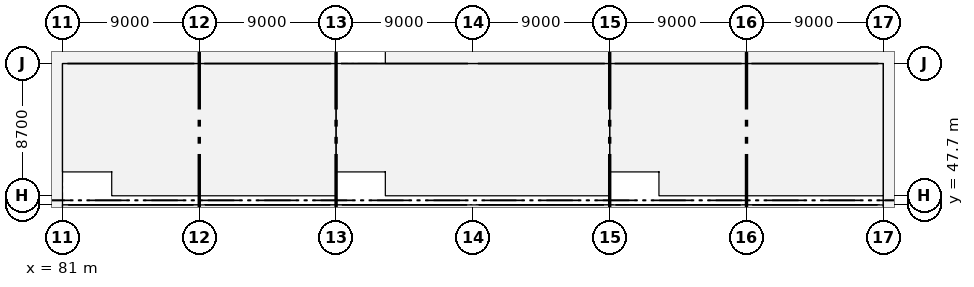
"""IFC4 building model, lengths in metres.
Left out: names, types, materials, properties, quantities, classifications, styles, units other than length and angle.
Written with IfcOpenShell. Run it as: python <this file> out.ifc"""

import sys

from ifc_helpers import new_model, si_unit, direction, frame, frame_2d, origin, origin_2d, place, context, subcontext, project, spatial, rectangle, extrude, element, fill, save


model = new_model("IFC4")
c1 = context("Model", 3, precision=1e-05, world=origin(), true_north=direction((0.0, 1.0)))
c2 = subcontext(c1, "Body", "Model", "MODEL_VIEW")
j1 = project(units=[si_unit("LENGTHUNIT", "METRE"), si_unit("PLANEANGLEUNIT", "RADIAN")], contexts=[c1])
p1 = place(None, origin())
s1 = spatial("IfcSite", under=j1, at=p1, CompositionType="ELEMENT")
p2 = place(p1, origin())
s2 = spatial("IfcBuilding", under=s1, at=p2, CompositionType="ELEMENT")
p3 = place(p2, origin())
s3 = spatial("IfcBuildingStorey", under=s2, at=p3, CompositionType="ELEMENT", Elevation=0.0)
p4 = place(p3, frame((81.0, 47.7, -0.5), z_axis=(0.0, 0.0, 1.0), x_axis=(1.0, 0.0, 0.0)))
e1 = element("IfcColumn", 1, at=p4, inside=s3, PredefinedType="COLUMN", context=c2, shape_type="SweptSolid", body=[
    extrude(rectangle(XDim=0.75, YDim=0.55, at=origin_2d()), origin(), (0.0, 0.0, 1.0), 6.8),
])
p5 = place(p3, frame((81.0, 48.3, -0.5), z_axis=(0.0, 0.0, 1.0), x_axis=(1.0, 0.0, 0.0)))
e2 = element("IfcColumn", 2, at=p5, inside=s3, PredefinedType="COLUMN", context=c2, shape_type="SweptSolid", body=[
    extrude(rectangle(XDim=0.75, YDim=0.55, at=origin_2d()), origin(), (0.0, 0.0, 1.0), 7.3),
])
p6 = place(p3, frame((81.0, 57.0, -0.5), z_axis=(0.0, 0.0, 1.0), x_axis=(1.0, 0.0, 0.0)))
e3 = element("IfcColumn", 3, at=p6, inside=s3, PredefinedType="COLUMN", context=c2, shape_type="SweptSolid", body=[
    extrude(rectangle(XDim=0.65, YDim=0.65, at=origin_2d()), origin(), (0.0, 0.0, 1.0), 7.3),
])
p7 = place(p3, frame((90.0, 47.7, -0.5), z_axis=(0.0, 0.0, 1.0), x_axis=(1.0, 0.0, 0.0)))
e4 = element("IfcColumn", 4, at=p7, inside=s3, PredefinedType="COLUMN", context=c2, shape_type="SweptSolid", body=[
    extrude(rectangle(XDim=0.75, YDim=0.55, at=origin_2d()), origin(), (0.0, 0.0, 1.0), 6.8),
])
p8 = place(p3, frame((90.0, 48.3, -0.5), z_axis=(0.0, 0.0, 1.0), x_axis=(1.0, 0.0, 0.0)))
e5 = element("IfcColumn", 5, at=p8, inside=s3, PredefinedType="COLUMN", context=c2, shape_type="SweptSolid", body=[
    extrude(rectangle(XDim=0.75, YDim=0.55, at=origin_2d()), origin(), (0.0, 0.0, 1.0), 7.3),
])
p9 = place(p3, frame((90.0, 57.0, -0.5), z_axis=(0.0, 0.0, 1.0), x_axis=(1.0, 0.0, 0.0)))
e6 = element("IfcColumn", 6, at=p9, inside=s3, PredefinedType="COLUMN", context=c2, shape_type="SweptSolid", body=[
    extrude(rectangle(XDim=0.65, YDim=0.65, at=origin_2d()), origin(), (0.0, 0.0, 1.0), 7.3),
])
p10 = place(p3, frame((99.0, 47.7, -0.5), z_axis=(0.0, 0.0, 1.0), x_axis=(1.0, 0.0, 0.0)))
e7 = element("IfcColumn", 7, at=p10, inside=s3, PredefinedType="COLUMN", context=c2, shape_type="SweptSolid", body=[
    extrude(rectangle(XDim=0.75, YDim=0.55, at=origin_2d()), origin(), (0.0, 0.0, 1.0), 6.8),
])
p11 = place(p3, frame((99.0, 48.3, -0.5), z_axis=(0.0, 0.0, 1.0), x_axis=(1.0, 0.0, 0.0)))
e8 = element("IfcColumn", 8, at=p11, inside=s3, PredefinedType="COLUMN", context=c2, shape_type="SweptSolid", body=[
    extrude(rectangle(XDim=0.75, YDim=0.55, at=origin_2d()), origin(), (0.0, 0.0, 1.0), 7.3),
])
p12 = place(p3, frame((99.0, 57.0, -0.5), z_axis=(0.0, 0.0, 1.0), x_axis=(1.0, 0.0, 0.0)))
e9 = element("IfcColumn", 9, at=p12, inside=s3, PredefinedType="COLUMN", context=c2, shape_type="SweptSolid", body=[
    extrude(rectangle(XDim=0.65, YDim=0.65, at=origin_2d()), origin(), (0.0, 0.0, 1.0), 7.3),
])
p13 = place(p3, frame((108.0, 47.7, -0.5), z_axis=(0.0, 0.0, 1.0), x_axis=(1.0, 0.0, 0.0)))
e10 = element("IfcColumn", 10, at=p13, inside=s3, PredefinedType="COLUMN", context=c2, shape_type="SweptSolid", body=[
    extrude(rectangle(XDim=0.75, YDim=0.55, at=origin_2d()), origin(), (0.0, 0.0, 1.0), 6.8),
])
p14 = place(p3, frame((108.0, 48.3, -0.5), z_axis=(0.0, 0.0, 1.0), x_axis=(1.0, 0.0, 0.0)))
e11 = element("IfcColumn", 11, at=p14, inside=s3, PredefinedType="COLUMN", context=c2, shape_type="SweptSolid", body=[
    extrude(rectangle(XDim=0.75, YDim=0.55, at=origin_2d()), origin(), (0.0, 0.0, 1.0), 7.3),
])
p15 = place(p3, frame((108.0, 57.0, -0.5), z_axis=(0.0, 0.0, 1.0), x_axis=(1.0, 0.0, 0.0)))
e12 = element("IfcColumn", 12, at=p15, inside=s3, PredefinedType="COLUMN", context=c2, shape_type="SweptSolid", body=[
    extrude(rectangle(XDim=0.65, YDim=0.65, at=origin_2d()), origin(), (0.0, 0.0, 1.0), 7.3),
])
p16 = place(p3, frame((117.0, 47.7, -0.5), z_axis=(0.0, 0.0, 1.0), x_axis=(1.0, 0.0, 0.0)))
e13 = element("IfcColumn", 13, at=p16, inside=s3, PredefinedType="COLUMN", context=c2, shape_type="SweptSolid", body=[
    extrude(rectangle(XDim=0.75, YDim=0.55, at=origin_2d()), origin(), (0.0, 0.0, 1.0), 6.8),
])
p17 = place(p3, frame((117.0, 48.3, -0.5), z_axis=(0.0, 0.0, 1.0), x_axis=(1.0, 0.0, 0.0)))
e14 = element("IfcColumn", 14, at=p17, inside=s3, PredefinedType="COLUMN", context=c2, shape_type="SweptSolid", body=[
    extrude(rectangle(XDim=0.75, YDim=0.55, at=origin_2d()), origin(), (0.0, 0.0, 1.0), 7.3),
])
p18 = place(p3, frame((117.0, 57.0, -0.5), z_axis=(0.0, 0.0, 1.0), x_axis=(1.0, 0.0, 0.0)))
e15 = element("IfcColumn", 15, at=p18, inside=s3, PredefinedType="COLUMN", context=c2, shape_type="SweptSolid", body=[
    extrude(rectangle(XDim=0.65, YDim=0.65, at=origin_2d()), origin(), (0.0, 0.0, 1.0), 7.3),
])
p19 = place(p3, frame((126.0, 47.7, -0.5), z_axis=(0.0, 0.0, 1.0), x_axis=(1.0, 0.0, 0.0)))
e16 = element("IfcColumn", 16, at=p19, inside=s3, PredefinedType="COLUMN", context=c2, shape_type="SweptSolid", body=[
    extrude(rectangle(XDim=0.75, YDim=0.55, at=origin_2d()), origin(), (0.0, 0.0, 1.0), 6.8),
])
p20 = place(p3, frame((126.0, 48.3, -0.5), z_axis=(0.0, 0.0, 1.0), x_axis=(1.0, 0.0, 0.0)))
e17 = element("IfcColumn", 17, at=p20, inside=s3, PredefinedType="COLUMN", context=c2, shape_type="SweptSolid", body=[
    extrude(rectangle(XDim=0.75, YDim=0.55, at=origin_2d()), origin(), (0.0, 0.0, 1.0), 7.3),
])
p21 = place(p3, frame((126.0, 57.0, -0.5), z_axis=(0.0, 0.0, 1.0), x_axis=(1.0, 0.0, 0.0)))
e18 = element("IfcColumn", 18, at=p21, inside=s3, PredefinedType="COLUMN", context=c2, shape_type="SweptSolid", body=[
    extrude(rectangle(XDim=0.65, YDim=0.65, at=origin_2d()), origin(), (0.0, 0.0, 1.0), 7.3),
])
p22 = place(p3, frame((135.0, 47.7, -0.5), z_axis=(0.0, 0.0, 1.0), x_axis=(1.0, 0.0, 0.0)))
e19 = element("IfcColumn", 19, at=p22, inside=s3, PredefinedType="COLUMN", context=c2, shape_type="SweptSolid", body=[
    extrude(rectangle(XDim=0.75, YDim=0.55, at=origin_2d()), origin(), (0.0, 0.0, 1.0), 6.8),
])
p23 = place(p3, frame((135.0, 48.3, -0.5), z_axis=(0.0, 0.0, 1.0), x_axis=(1.0, 0.0, 0.0)))
e20 = element("IfcColumn", 20, at=p23, inside=s3, PredefinedType="COLUMN", context=c2, shape_type="SweptSolid", body=[
    extrude(rectangle(XDim=0.75, YDim=0.55, at=origin_2d()), origin(), (0.0, 0.0, 1.0), 7.3),
])
p24 = place(p3, frame((135.0, 57.0, -0.5), z_axis=(0.0, 0.0, 1.0), x_axis=(1.0, 0.0, 0.0)))
e21 = element("IfcColumn", 21, at=p24, inside=s3, PredefinedType="COLUMN", context=c2, shape_type="SweptSolid", body=[
    extrude(rectangle(XDim=0.65, YDim=0.65, at=origin_2d()), origin(), (0.0, 0.0, 1.0), 7.3),
])
p25 = place(p3, frame((81.375, 47.7, 0.0), z_axis=(0.0, 0.0, 1.0), x_axis=(1.0, 0.0, 0.0)))
e22 = element("IfcWall", 22, at=p25, inside=s3, PredefinedType="SOLIDWALL", context=c2, shape_type="SweptSolid", body=[
    extrude(rectangle(XDim=8.25, YDim=0.34, at=frame_2d((4.125, 0.0))), origin(), (0.0, 0.0, 1.0), 5.1),
])
p26 = place(p25, frame((1.85, 0.0, 0.85)))
e23 = element("IfcOpeningElement", 23, at=p26, cuts=e22, PredefinedType="OPENING", context=c2, shape_type="SweptSolid", body=[
    extrude(rectangle(XDim=1.8, YDim=3.15, at=frame_2d((0.9, 1.575))), frame((0.0, 0.18, 0.0), z_axis=(0.0, -1.0, 0.0), x_axis=(1.0, 0.0, 0.0)), (0.0, 0.0, 1.0), 0.36),
])
p27 = place(p25, frame((4.6, 0.0, 0.85)))
e24 = element("IfcOpeningElement", 24, at=p27, cuts=e22, PredefinedType="OPENING", context=c2, shape_type="SweptSolid", body=[
    extrude(rectangle(XDim=1.8, YDim=3.15, at=frame_2d((0.9, 1.575))), frame((0.0, 0.18, 0.0), z_axis=(0.0, -1.0, 0.0), x_axis=(1.0, 0.0, 0.0)), (0.0, 0.0, 1.0), 0.36),
])
p28 = place(p3, frame((90.375, 47.7, 0.0), z_axis=(0.0, 0.0, 1.0), x_axis=(1.0, 0.0, 0.0)))
e25 = element("IfcWall", 25, at=p28, inside=s3, PredefinedType="SOLIDWALL", context=c2, shape_type="SweptSolid", body=[
    extrude(rectangle(XDim=8.25, YDim=0.34, at=frame_2d((4.125, 0.0))), origin(), (0.0, 0.0, 1.0), 5.1),
])
p29 = place(p28, frame((3.125, 0.0, 0.0)))
e26 = element("IfcOpeningElement", 26, at=p29, cuts=e25, PredefinedType="OPENING", context=c2, shape_type="SweptSolid", body=[
    extrude(rectangle(XDim=2.0, YDim=2.75, at=frame_2d((1.0, 1.375))), frame((0.0, 0.18, 0.0), z_axis=(0.0, -1.0, 0.0), x_axis=(1.0, 0.0, 0.0)), (0.0, 0.0, 1.0), 0.36),
])
p30 = place(p3, frame((99.375, 47.7, 0.0), z_axis=(0.0, 0.0, 1.0), x_axis=(1.0, 0.0, 0.0)))
e27 = element("IfcWall", 27, at=p30, inside=s3, PredefinedType="SOLIDWALL", context=c2, shape_type="SweptSolid", body=[
    extrude(rectangle(XDim=8.25, YDim=0.34, at=frame_2d((4.125, 0.0))), origin(), (0.0, 0.0, 1.0), 5.1),
])
p31 = place(p30, frame((1.85, 0.0, 0.85)))
e28 = element("IfcOpeningElement", 28, at=p31, cuts=e27, PredefinedType="OPENING", context=c2, shape_type="SweptSolid", body=[
    extrude(rectangle(XDim=1.8, YDim=3.15, at=frame_2d((0.9, 1.575))), frame((0.0, 0.18, 0.0), z_axis=(0.0, -1.0, 0.0), x_axis=(1.0, 0.0, 0.0)), (0.0, 0.0, 1.0), 0.36),
])
p32 = place(p30, frame((4.6, 0.0, 0.85)))
e29 = element("IfcOpeningElement", 29, at=p32, cuts=e27, PredefinedType="OPENING", context=c2, shape_type="SweptSolid", body=[
    extrude(rectangle(XDim=1.8, YDim=3.15, at=frame_2d((0.9, 1.575))), frame((0.0, 0.18, 0.0), z_axis=(0.0, -1.0, 0.0), x_axis=(1.0, 0.0, 0.0)), (0.0, 0.0, 1.0), 0.36),
])
p33 = place(p3, frame((108.375, 47.7, 0.0), z_axis=(0.0, 0.0, 1.0), x_axis=(1.0, 0.0, 0.0)))
e30 = element("IfcWall", 30, at=p33, inside=s3, PredefinedType="SOLIDWALL", context=c2, shape_type="SweptSolid", body=[
    extrude(rectangle(XDim=8.25, YDim=0.34, at=frame_2d((4.125, 0.0))), origin(), (0.0, 0.0, 1.0), 5.1),
])
p34 = place(p33, frame((3.125, 0.0, 0.0)))
e31 = element("IfcOpeningElement", 31, at=p34, cuts=e30, PredefinedType="OPENING", context=c2, shape_type="SweptSolid", body=[
    extrude(rectangle(XDim=2.0, YDim=2.75, at=frame_2d((1.0, 1.375))), frame((0.0, 0.18, 0.0), z_axis=(0.0, -1.0, 0.0), x_axis=(1.0, 0.0, 0.0)), (0.0, 0.0, 1.0), 0.36),
])
p35 = place(p3, frame((117.375, 47.7, 0.0), z_axis=(0.0, 0.0, 1.0), x_axis=(1.0, 0.0, 0.0)))
e32 = element("IfcWall", 32, at=p35, inside=s3, PredefinedType="SOLIDWALL", context=c2, shape_type="SweptSolid", body=[
    extrude(rectangle(XDim=8.25, YDim=0.34, at=frame_2d((4.125, 0.0))), origin(), (0.0, 0.0, 1.0), 5.1),
])
p36 = place(p35, frame((1.85, 0.0, 0.85)))
e33 = element("IfcOpeningElement", 33, at=p36, cuts=e32, PredefinedType="OPENING", context=c2, shape_type="SweptSolid", body=[
    extrude(rectangle(XDim=1.8, YDim=3.15, at=frame_2d((0.9, 1.575))), frame((0.0, 0.18, 0.0), z_axis=(0.0, -1.0, 0.0), x_axis=(1.0, 0.0, 0.0)), (0.0, 0.0, 1.0), 0.36),
])
p37 = place(p35, frame((4.6, 0.0, 0.85)))
e34 = element("IfcOpeningElement", 34, at=p37, cuts=e32, PredefinedType="OPENING", context=c2, shape_type="SweptSolid", body=[
    extrude(rectangle(XDim=1.8, YDim=3.15, at=frame_2d((0.9, 1.575))), frame((0.0, 0.18, 0.0), z_axis=(0.0, -1.0, 0.0), x_axis=(1.0, 0.0, 0.0)), (0.0, 0.0, 1.0), 0.36),
])
p38 = place(p3, frame((126.375, 47.7, 0.0), z_axis=(0.0, 0.0, 1.0), x_axis=(1.0, 0.0, 0.0)))
e35 = element("IfcWall", 35, at=p38, inside=s3, PredefinedType="SOLIDWALL", context=c2, shape_type="SweptSolid", body=[
    extrude(rectangle(XDim=8.25, YDim=0.34, at=frame_2d((4.125, 0.0))), origin(), (0.0, 0.0, 1.0), 5.1),
])
p39 = place(p38, frame((3.125, 0.0, 0.0)))
e36 = element("IfcOpeningElement", 36, at=p39, cuts=e35, PredefinedType="OPENING", context=c2, shape_type="SweptSolid", body=[
    extrude(rectangle(XDim=2.0, YDim=2.75, at=frame_2d((1.0, 1.375))), frame((0.0, 0.18, 0.0), z_axis=(0.0, -1.0, 0.0), x_axis=(1.0, 0.0, 0.0)), (0.0, 0.0, 1.0), 0.36),
])
for number, where, z_axis, x_axis in (
    (37, (81.325, 57.0, 4.45), (0.0, 0.0, 1.0), (1.0, 0.0, 0.0)),
    (38, (90.325, 57.0, 4.45), (0.0, 0.0, 1.0), (1.0, 0.0, 0.0)),
    (39, (99.325, 57.0, 4.45), (0.0, 0.0, 1.0), (1.0, 0.0, 0.0)),
    (40, (108.325, 57.0, 4.45), (0.0, 0.0, 1.0), (1.0, 0.0, 0.0)),
    (41, (117.325, 57.0, 4.45), (0.0, 0.0, 1.0), (1.0, 0.0, 0.0)),
    (42, (126.325, 57.0, 4.45), (0.0, 0.0, 1.0), (1.0, 0.0, 0.0)),
):
    element("IfcWall", number, at=place(p3, frame(where, z_axis=z_axis, x_axis=x_axis)), inside=s3, PredefinedType="SOLIDWALL", context=c2, shape_type="SweptSolid", body=[
        extrude(rectangle(XDim=8.35, YDim=0.3, at=frame_2d((4.175, 0.0))), origin(), (0.0, 0.0, 1.0), 1.29),
    ])
p40 = place(p26, origin())
e43 = element("IfcWindow", 43, at=p40, inside=s3, PartitioningType="DOUBLE_PANEL_VERTICAL", PredefinedType="WINDOW", context=c2, shape_type="SweptSolid", body=[
    extrude(rectangle(XDim=1.8, YDim=3.15, at=frame_2d((0.9, 1.575))), frame((0.0, 0.03, 0.0), z_axis=(0.0, -1.0, 0.0), x_axis=(1.0, 0.0, 0.0)), (0.0, 0.0, 1.0), 0.06),
])
fill(e23, e43)
p41 = place(p27, origin())
e44 = element("IfcWindow", 44, at=p41, inside=s3, PartitioningType="DOUBLE_PANEL_VERTICAL", PredefinedType="WINDOW", context=c2, shape_type="SweptSolid", body=[
    extrude(rectangle(XDim=1.8, YDim=3.15, at=frame_2d((0.9, 1.575))), frame((0.0, 0.03, 0.0), z_axis=(0.0, -1.0, 0.0), x_axis=(1.0, 0.0, 0.0)), (0.0, 0.0, 1.0), 0.06),
])
fill(e24, e44)
p42 = place(p29, origin())
e45 = element("IfcDoor", 45, at=p42, inside=s3, OperationType="DOUBLE_DOOR_SINGLE_SWING", PredefinedType="DOOR", context=c2, shape_type="SweptSolid", body=[
    extrude(rectangle(XDim=2.0, YDim=2.75, at=frame_2d((1.0, 1.375))), frame((0.0, 0.025, 0.0), z_axis=(0.0, -1.0, 0.0), x_axis=(1.0, 0.0, 0.0)), (0.0, 0.0, 1.0), 0.05),
])
fill(e26, e45)
p43 = place(p31, origin())
e46 = element("IfcWindow", 46, at=p43, inside=s3, PartitioningType="DOUBLE_PANEL_VERTICAL", PredefinedType="WINDOW", context=c2, shape_type="SweptSolid", body=[
    extrude(rectangle(XDim=1.8, YDim=3.15, at=frame_2d((0.9, 1.575))), frame((0.0, 0.03, 0.0), z_axis=(0.0, -1.0, 0.0), x_axis=(1.0, 0.0, 0.0)), (0.0, 0.0, 1.0), 0.06),
])
fill(e28, e46)
p44 = place(p32, origin())
e47 = element("IfcWindow", 47, at=p44, inside=s3, PartitioningType="DOUBLE_PANEL_VERTICAL", PredefinedType="WINDOW", context=c2, shape_type="SweptSolid", body=[
    extrude(rectangle(XDim=1.8, YDim=3.15, at=frame_2d((0.9, 1.575))), frame((0.0, 0.03, 0.0), z_axis=(0.0, -1.0, 0.0), x_axis=(1.0, 0.0, 0.0)), (0.0, 0.0, 1.0), 0.06),
])
fill(e29, e47)
p45 = place(p34, origin())
e48 = element("IfcDoor", 48, at=p45, inside=s3, OperationType="DOUBLE_DOOR_SINGLE_SWING", PredefinedType="DOOR", context=c2, shape_type="SweptSolid", body=[
    extrude(rectangle(XDim=2.0, YDim=2.75, at=frame_2d((1.0, 1.375))), frame((0.0, 0.025, 0.0), z_axis=(0.0, -1.0, 0.0), x_axis=(1.0, 0.0, 0.0)), (0.0, 0.0, 1.0), 0.05),
])
fill(e31, e48)
p46 = place(p36, origin())
e49 = element("IfcWindow", 49, at=p46, inside=s3, PartitioningType="DOUBLE_PANEL_VERTICAL", PredefinedType="WINDOW", context=c2, shape_type="SweptSolid", body=[
    extrude(rectangle(XDim=1.8, YDim=3.15, at=frame_2d((0.9, 1.575))), frame((0.0, 0.03, 0.0), z_axis=(0.0, -1.0, 0.0), x_axis=(1.0, 0.0, 0.0)), (0.0, 0.0, 1.0), 0.06),
])
fill(e33, e49)
p47 = place(p37, origin())
e50 = element("IfcWindow", 50, at=p47, inside=s3, PartitioningType="DOUBLE_PANEL_VERTICAL", PredefinedType="WINDOW", context=c2, shape_type="SweptSolid", body=[
    extrude(rectangle(XDim=1.8, YDim=3.15, at=frame_2d((0.9, 1.575))), frame((0.0, 0.03, 0.0), z_axis=(0.0, -1.0, 0.0), x_axis=(1.0, 0.0, 0.0)), (0.0, 0.0, 1.0), 0.06),
])
fill(e34, e50)
p48 = place(p39, origin())
e51 = element("IfcDoor", 51, at=p48, inside=s3, OperationType="DOUBLE_DOOR_SINGLE_SWING", PredefinedType="DOOR", context=c2, shape_type="SweptSolid", body=[
    extrude(rectangle(XDim=2.0, YDim=2.75, at=frame_2d((1.0, 1.375))), frame((0.0, 0.025, 0.0), z_axis=(0.0, -1.0, 0.0), x_axis=(1.0, 0.0, 0.0)), (0.0, 0.0, 1.0), 0.05),
])
fill(e36, e51)
save(model, sys.argv[1])
